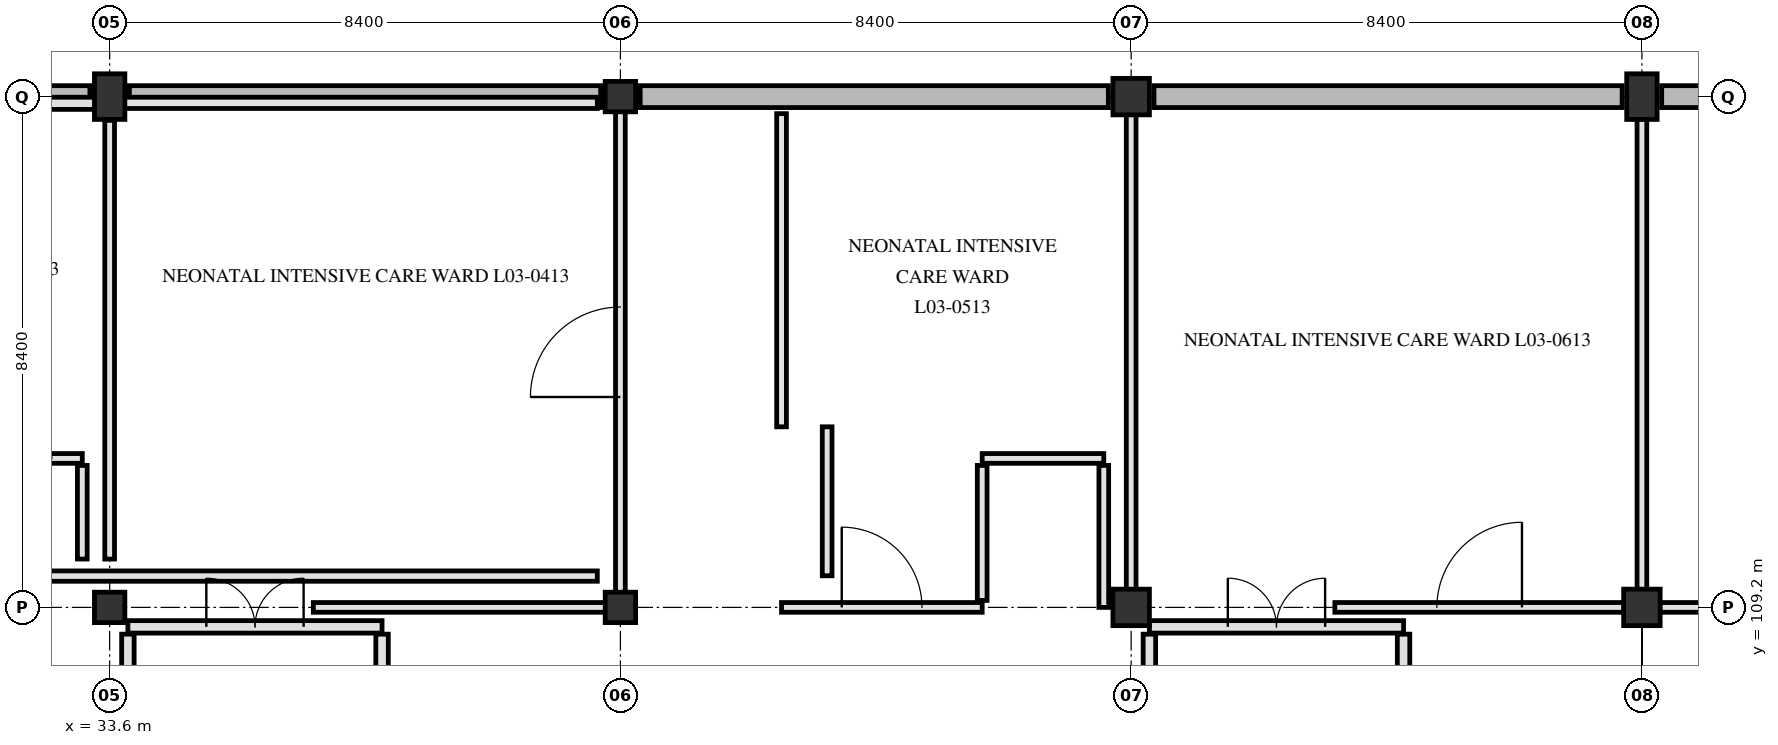
"""IFC4 building model, lengths in metres.
Left out: names, types, materials, properties, quantities, classifications, styles, units other than length and angle.
Written with IfcOpenShell. Run it as: python <this file> out.ifc"""

import sys

from ifc_helpers import new_model, si_unit, direction, frame, frame_2d, origin, origin_2d, place, context, subcontext, project, spatial, rectangle, extrude, element, fill, save


model = new_model("IFC4")
c1 = context("Model", 3, precision=1e-05, world=origin(), true_north=direction((0.0, 1.0)))
c2 = subcontext(c1, "Body", "Model", "MODEL_VIEW")
j1 = project(units=[si_unit("LENGTHUNIT", "METRE"), si_unit("PLANEANGLEUNIT", "RADIAN")], contexts=[c1])
p1 = place(None, origin())
s1 = spatial("IfcSite", under=j1, at=p1, CompositionType="ELEMENT")
p2 = place(p1, origin())
s2 = spatial("IfcBuilding", under=s1, at=p2, CompositionType="ELEMENT")
p3 = place(p2, frame((0.0, 0.0, 14.4)))
s3 = spatial("IfcBuildingStorey", under=s2, at=p3, CompositionType="ELEMENT", Elevation=14.4)
p4 = place(p3, frame((33.6, 109.2, 0.0), z_axis=(0.0, 0.0, 1.0), x_axis=(1.0, 0.0, 0.0)))
e1 = element("IfcColumn", 1, at=p4, inside=s3, PredefinedType="COLUMN", context=c2, shape_type="SweptSolid", body=[
    extrude(rectangle(XDim=0.5, YDim=0.5, at=origin_2d()), origin(), (0.0, 0.0, 1.0), 4.2),
])
p5 = place(p3, frame((33.6, 117.6, 0.0), z_axis=(0.0, 0.0, 1.0), x_axis=(1.0, 0.0, 0.0)))
e2 = element("IfcColumn", 2, at=p5, inside=s3, PredefinedType="PILASTER", context=c2, shape_type="SweptSolid", body=[
    extrude(rectangle(XDim=0.5, YDim=0.75, at=origin_2d()), origin(), (0.0, 0.0, 1.0), 4.2),
])
for number, where, z_axis, x_axis in (
    (3, (42.0, 109.2, 0.0), (0.0, 0.0, 1.0), (1.0, 0.0, 0.0)),
    (4, (42.0, 117.6, 0.0), (0.0, 0.0, 1.0), (1.0, 0.0, 0.0)),
):
    element("IfcColumn", number, at=place(p3, frame(where, z_axis=z_axis, x_axis=x_axis)), inside=s3, PredefinedType="COLUMN", context=c2, shape_type="SweptSolid", body=[
        extrude(rectangle(XDim=0.5, YDim=0.5, at=origin_2d()), origin(), (0.0, 0.0, 1.0), 4.2),
    ])
for number, where, z_axis, x_axis in (
    (5, (50.4, 109.2, 0.0), (0.0, 0.0, 1.0), (1.0, 0.0, 0.0)),
    (6, (50.4, 117.6, 0.0), (0.0, 0.0, 1.0), (1.0, 0.0, 0.0)),
    (7, (58.8, 109.2, 0.0), (0.0, 0.0, 1.0), (1.0, 0.0, 0.0)),
):
    element("IfcColumn", number, at=place(p3, frame(where, z_axis=z_axis, x_axis=x_axis)), inside=s3, PredefinedType="COLUMN", context=c2, shape_type="SweptSolid", body=[
        extrude(rectangle(XDim=0.6, YDim=0.6, at=origin_2d()), origin(), (0.0, 0.0, 1.0), 4.2),
    ])
p6 = place(p3, frame((58.8, 117.6, 0.0), z_axis=(0.0, 0.0, 1.0), x_axis=(1.0, 0.0, 0.0)))
e8 = element("IfcColumn", 8, at=p6, inside=s3, PredefinedType="PILASTER", context=c2, shape_type="SweptSolid", body=[
    extrude(rectangle(XDim=0.5, YDim=0.75, at=origin_2d()), origin(), (0.0, 0.0, 1.0), 4.2),
])
for number, where, z_axis, x_axis in (
    (9, (25.525, 117.6, 0.0), (0.0, 0.0, 1.0), (1.0, 0.0, 0.0)),
    (10, (33.925, 117.6, 0.0), (0.0, 0.0, 1.0), (1.0, 0.0, 0.0)),
):
    element("IfcWall", number, at=place(p3, frame(where, z_axis=z_axis, x_axis=x_axis)), inside=s3, PredefinedType="SOLIDWALL", context=c2, shape_type="SweptSolid", body=[
        extrude(rectangle(XDim=7.75, YDim=0.36, at=frame_2d((3.875, 0.0))), origin(), (0.0, 0.0, 1.0), 3.9),
    ])
p7 = place(p3, frame((42.325, 117.6, 0.0), z_axis=(0.0, 0.0, 1.0), x_axis=(1.0, 0.0, 0.0)))
e11 = element("IfcWall", 11, at=p7, inside=s3, PredefinedType="SOLIDWALL", context=c2, shape_type="SweptSolid", body=[
    extrude(rectangle(XDim=7.7, YDim=0.36, at=frame_2d((3.85, 0.0))), origin(), (0.0, 0.0, 1.0), 3.9),
])
p8 = place(p3, frame((50.775, 117.6, 0.0), z_axis=(0.0, 0.0, 1.0), x_axis=(1.0, 0.0, 0.0)))
e12 = element("IfcWall", 12, at=p8, inside=s3, PredefinedType="SOLIDWALL", context=c2, shape_type="SweptSolid", body=[
    extrude(rectangle(XDim=7.7, YDim=0.36, at=frame_2d((3.85, 0.0))), origin(), (0.0, 0.0, 1.0), 3.9),
])
p9 = place(p3, frame((59.125, 117.6, 0.0), z_axis=(0.0, 0.0, 1.0), x_axis=(1.0, 0.0, 0.0)))
e13 = element("IfcWall", 13, at=p9, inside=s3, PredefinedType="SOLIDWALL", context=c2, shape_type="SweptSolid", body=[
    extrude(rectangle(XDim=7.65, YDim=0.36, at=frame_2d((3.825, 0.0))), origin(), (0.0, 0.0, 1.0), 3.9),
])
p10 = place(p3, frame((25.2, 117.49, 4.18), z_axis=(0.0, 0.0, 1.0), x_axis=(1.0, 0.0, 0.0)))
e14 = element("IfcWall", 14, at=p10, inside=s3, PredefinedType="PARAPET", context=c2, shape_type="SweptSolid", body=[
    extrude(rectangle(XDim=8.4, YDim=0.2, at=frame_2d((4.2, 0.0))), origin(), (0.0, 0.0, 1.0), 1.17),
])
p11 = place(p3, frame((33.6, 117.498, 4.18), z_axis=(0.0, 0.0, 1.0), x_axis=(1.0, 0.0, 0.0)))
e15 = element("IfcWall", 15, at=p11, inside=s3, PredefinedType="PARAPET", context=c2, shape_type="SweptSolid", body=[
    extrude(rectangle(XDim=8.02, YDim=0.185, at=frame_2d((4.01, 0.0))), origin(), (0.0, 0.0, 1.0), 1.17),
])
p12 = place(p3, frame((41.62, 109.715, 4.18), z_axis=(0.0, 0.0, 1.0), x_axis=(-1.0, 0.0, 0.0)))
e16 = element("IfcWall", 16, at=p12, inside=s3, PredefinedType="PARAPET", context=c2, shape_type="SweptSolid", body=[
    extrude(rectangle(XDim=33.22, YDim=0.17, at=frame_2d((16.61, 0.0))), origin(), (0.0, 0.0, 1.0), 1.17),
])
p13 = place(p3, frame((38.08, 104.64, 0.0), z_axis=(0.0, 0.0, 1.0), x_axis=(0.0, 1.0, 0.0)))
e17 = element("IfcWall", 17, at=p13, inside=s3, PredefinedType="PARTITIONING", context=c2, shape_type="SweptSolid", body=[
    extrude(rectangle(XDim=4.12, YDim=0.205, at=frame_2d((2.06, 0.0))), origin(), (0.0, 0.0, 1.0), 3.89),
])
p14 = place(p3, frame((33.9, 104.64, 0.0), z_axis=(0.0, 0.0, 1.0), x_axis=(0.0, 1.0, 0.0)))
e18 = element("IfcWall", 18, at=p14, inside=s3, PredefinedType="PARTITIONING", context=c2, shape_type="SweptSolid", body=[
    extrude(rectangle(XDim=4.12, YDim=0.205, at=frame_2d((2.06, 0.0))), origin(), (0.0, 0.0, 1.0), 3.33),
])
p15 = place(p3, frame((33.9, 108.88, 0.0), z_axis=(0.0, 0.0, 1.0), x_axis=(1.0, 0.0, 0.0)))
e19 = element("IfcWall", 19, at=p15, inside=s3, PredefinedType="PARTITIONING", context=c2, shape_type="SweptSolid", body=[
    extrude(rectangle(XDim=4.18, YDim=0.205, at=frame_2d((2.09, 0.0))), origin(), (0.0, 0.0, 1.0), 3.28),
])
p16 = place(p15, frame((1.29, 0.0, 0.0)))
e20 = element("IfcOpeningElement", 20, at=p16, cuts=e19, PredefinedType="OPENING", context=c2, shape_type="SweptSolid", body=[
    extrude(rectangle(XDim=1.6, YDim=2.25, at=frame_2d((0.8, 1.125))), frame((0.0, 0.113, 0.0), z_axis=(0.0, -1.0, 0.0), x_axis=(1.0, 0.0, 0.0)), (0.0, 0.0, 1.0), 0.225),
])
p17 = place(p3, frame((54.88, 104.64, 0.0), z_axis=(0.0, 0.0, 1.0), x_axis=(0.0, 1.0, 0.0)))
e21 = element("IfcWall", 21, at=p17, inside=s3, PredefinedType="PARTITIONING", context=c2, shape_type="SweptSolid", body=[
    extrude(rectangle(XDim=4.12, YDim=0.205, at=frame_2d((2.06, 0.0))), origin(), (0.0, 0.0, 1.0), 3.89),
])
p18 = place(p3, frame((50.7, 104.64, 0.0), z_axis=(0.0, 0.0, 1.0), x_axis=(0.0, 1.0, 0.0)))
e22 = element("IfcWall", 22, at=p18, inside=s3, PredefinedType="PARTITIONING", context=c2, shape_type="SweptSolid", body=[
    extrude(rectangle(XDim=4.12, YDim=0.205, at=frame_2d((2.06, 0.0))), origin(), (0.0, 0.0, 1.0), 2.89),
])
p19 = place(p3, frame((50.7, 108.88, 0.0), z_axis=(0.0, 0.0, 1.0), x_axis=(1.0, 0.0, 0.0)))
e23 = element("IfcWall", 23, at=p19, inside=s3, PredefinedType="PARTITIONING", context=c2, shape_type="SweptSolid", body=[
    extrude(rectangle(XDim=4.18, YDim=0.205, at=frame_2d((2.09, 0.0))), origin(), (0.0, 0.0, 1.0), 2.89),
])
p20 = place(p19, frame((1.29, 0.0, 0.0)))
e24 = element("IfcOpeningElement", 24, at=p20, cuts=e23, PredefinedType="OPENING", context=c2, shape_type="SweptSolid", body=[
    extrude(rectangle(XDim=1.6, YDim=2.25, at=frame_2d((0.8, 1.125))), frame((0.0, 0.113, 0.0), z_axis=(0.0, -1.0, 0.0), x_axis=(1.0, 0.0, 0.0)), (0.0, 0.0, 1.0), 0.225),
])
p21 = place(p3, frame((36.95, 109.2, 0.0), z_axis=(0.0, 0.0, 1.0), x_axis=(1.0, 0.0, 0.0)))
e25 = element("IfcWall", 25, at=p21, inside=s3, PredefinedType="PARTITIONING", context=c2, shape_type="SweptSolid", body=[
    extrude(rectangle(XDim=4.805, YDim=0.16, at=frame_2d((2.402, 0.0))), origin(), (0.0, 0.0, 1.0), 3.28),
])
p22 = place(p3, frame((44.65, 109.2, 0.0), z_axis=(0.0, 0.0, 1.0), x_axis=(1.0, 0.0, 0.0)))
e26 = element("IfcWall", 26, at=p22, inside=s3, PredefinedType="PARTITIONING", context=c2, shape_type="SweptSolid", body=[
    extrude(rectangle(XDim=3.3, YDim=0.16, at=frame_2d((1.65, 0.0))), origin(), (0.0, 0.0, 1.0), 3.29),
])
p23 = place(p22, frame((0.99, 0.0, 0.0)))
e27 = element("IfcOpeningElement", 27, at=p23, cuts=e26, PredefinedType="OPENING", context=c2, shape_type="SweptSolid", body=[
    extrude(rectangle(XDim=1.32, YDim=2.18, at=frame_2d((0.66, 1.09))), frame((0.0, 0.09, 0.0), z_axis=(0.0, -1.0, 0.0), x_axis=(1.0, 0.0, 0.0)), (0.0, 0.0, 1.0), 0.18),
])
p24 = place(p3, frame((53.75, 109.2, 0.0), z_axis=(0.0, 0.0, 1.0), x_axis=(1.0, 0.0, 0.0)))
e28 = element("IfcWall", 28, at=p24, inside=s3, PredefinedType="PARTITIONING", context=c2, shape_type="SweptSolid", body=[
    extrude(rectangle(XDim=4.755, YDim=0.16, at=frame_2d((2.377, 0.0))), origin(), (0.0, 0.0, 1.0), 3.29),
])
p25 = place(p24, frame((1.677, 0.0, 0.0)))
e29 = element("IfcOpeningElement", 29, at=p25, cuts=e28, PredefinedType="OPENING", context=c2, shape_type="SweptSolid", body=[
    extrude(rectangle(XDim=1.4, YDim=2.2, at=frame_2d((0.7, 1.1))), frame((0.0, 0.09, 0.0), z_axis=(0.0, -1.0, 0.0), x_axis=(1.0, 0.0, 0.0)), (0.0, 0.0, 1.0), 0.18),
])
p26 = place(p3, frame((59.095, 109.2, 0.0), z_axis=(0.0, 0.0, 1.0), x_axis=(1.0, 0.0, 0.0)))
e30 = element("IfcWall", 30, at=p26, inside=s3, PredefinedType="PARTITIONING", context=c2, shape_type="SweptSolid", body=[
    extrude(rectangle(XDim=7.76, YDim=0.16, at=frame_2d((3.88, 0.0))), origin(), (0.0, 0.0, 1.0), 3.29),
])
p27 = place(p26, frame((3.38, 0.0, 0.0)))
e31 = element("IfcOpeningElement", 31, at=p27, cuts=e30, PredefinedType="OPENING", context=c2, shape_type="SweptSolid", body=[
    extrude(rectangle(XDim=1.0, YDim=2.15, at=frame_2d((0.5, 1.075))), frame((0.0, 0.09, 0.0), z_axis=(0.0, -1.0, 0.0), x_axis=(1.0, 0.0, 0.0)), (0.0, 0.0, 1.0), 0.18),
])
p28 = place(p3, frame((31.15, 111.65, 0.0), z_axis=(0.0, 0.0, 1.0), x_axis=(1.0, 0.0, 0.0)))
e32 = element("IfcWall", 32, at=p28, inside=s3, PredefinedType="PARTITIONING", context=c2, shape_type="SweptSolid", body=[
    extrude(rectangle(XDim=2.0, YDim=0.16, at=frame_2d((1.0, 0.0))), origin(), (0.0, 0.0, 1.0), 3.89),
])
p29 = place(p28, frame((0.5, 0.0, 0.0)))
e33 = element("IfcOpeningElement", 33, at=p29, cuts=e32, PredefinedType="OPENING", context=c2, shape_type="SweptSolid", body=[
    extrude(rectangle(XDim=1.0, YDim=2.15, at=frame_2d((0.5, 1.075))), frame((0.0, 0.09, 0.0), z_axis=(0.0, -1.0, 0.0), x_axis=(1.0, 0.0, 0.0)), (0.0, 0.0, 1.0), 0.18),
])
p30 = place(p3, frame((47.95, 111.65, 0.0), z_axis=(0.0, 0.0, 1.0), x_axis=(1.0, 0.0, 0.0)))
e34 = element("IfcWall", 34, at=p30, inside=s3, PredefinedType="PARTITIONING", context=c2, shape_type="SweptSolid", body=[
    extrude(rectangle(XDim=2.0, YDim=0.16, at=frame_2d((1.0, 0.0))), origin(), (0.0, 0.0, 1.0), 3.89),
])
p31 = place(p3, frame((33.15, 109.995, 0.0), z_axis=(0.0, 0.0, 1.0), x_axis=(0.0, 1.0, 0.0)))
e35 = element("IfcWall", 35, at=p31, inside=s3, PredefinedType="PARTITIONING", context=c2, shape_type="SweptSolid", body=[
    extrude(rectangle(XDim=1.54, YDim=0.16, at=frame_2d((0.77, 0.0))), origin(), (0.0, 0.0, 1.0), 3.89),
])
p32 = place(p3, frame((33.6, 109.995, 0.0), z_axis=(0.0, 0.0, 1.0), x_axis=(0.0, 1.0, 0.0)))
e36 = element("IfcWall", 36, at=p32, inside=s3, PredefinedType="PARTITIONING", context=c2, shape_type="SweptSolid", body=[
    extrude(rectangle(XDim=7.215, YDim=0.16, at=frame_2d((3.607, 0.0))), origin(), (0.0, 0.0, 1.0), 3.34),
])
p33 = place(p3, frame((42.0, 109.445, 0.0), z_axis=(0.0, 0.0, 1.0), x_axis=(0.0, 1.0, 0.0)))
e37 = element("IfcWall", 37, at=p33, inside=s3, PredefinedType="PARTITIONING", context=c2, shape_type="SweptSolid", body=[
    extrude(rectangle(XDim=7.91, YDim=0.16, at=frame_2d((3.955, 0.0))), origin(), (0.0, 0.0, 1.0), 3.34),
])
p34 = place(p33, frame((3.215, 0.0, 0.0)))
e38 = element("IfcOpeningElement", 38, at=p34, cuts=e37, PredefinedType="OPENING", context=c2, shape_type="SweptSolid", body=[
    extrude(rectangle(XDim=1.48, YDim=2.22, at=frame_2d((0.74, 1.11))), frame((0.0, 0.09, 0.0), z_axis=(0.0, -1.0, 0.0), x_axis=(1.0, 0.0, 0.0)), (0.0, 0.0, 1.0), 0.18),
])
p35 = place(p3, frame((44.65, 112.17, 0.0), z_axis=(0.0, 0.0, 1.0), x_axis=(0.0, 1.0, 0.0)))
e39 = element("IfcWall", 39, at=p35, inside=s3, PredefinedType="PARTITIONING", context=c2, shape_type="SweptSolid", body=[
    extrude(rectangle(XDim=5.15, YDim=0.16, at=frame_2d((2.575, 0.0))), origin(), (0.0, 0.0, 1.0), 3.89),
])
p36 = place(p3, frame((45.4, 109.72, 0.0), z_axis=(0.0, 0.0, 1.0), x_axis=(0.0, 1.0, 0.0)))
e40 = element("IfcWall", 40, at=p36, inside=s3, PredefinedType="PARTITIONING", context=c2, shape_type="SweptSolid", body=[
    extrude(rectangle(XDim=2.45, YDim=0.16, at=frame_2d((1.225, 0.0))), origin(), (0.0, 0.0, 1.0), 3.89),
])
p37 = place(p3, frame((47.95, 109.315, 0.0), z_axis=(0.0, 0.0, 1.0), x_axis=(0.0, 1.0, 0.0)))
e41 = element("IfcWall", 41, at=p37, inside=s3, PredefinedType="PARTITIONING", context=c2, shape_type="SweptSolid", body=[
    extrude(rectangle(XDim=2.22, YDim=0.16, at=frame_2d((1.11, 0.0))), origin(), (0.0, 0.0, 1.0), 3.29),
])
p38 = place(p3, frame((49.95, 109.2, 0.0), z_axis=(0.0, 0.0, 1.0), x_axis=(0.0, 1.0, 0.0)))
e42 = element("IfcWall", 42, at=p38, inside=s3, PredefinedType="PARTITIONING", context=c2, shape_type="SweptSolid", body=[
    extrude(rectangle(XDim=2.335, YDim=0.16, at=frame_2d((1.167, 0.0))), origin(), (0.0, 0.0, 1.0), 3.29),
])
p39 = place(p3, frame((50.4, 109.495, 0.0), z_axis=(0.0, 0.0, 1.0), x_axis=(0.0, 1.0, 0.0)))
e43 = element("IfcWall", 43, at=p39, inside=s3, PredefinedType="PARTITIONING", context=c2, shape_type="SweptSolid", body=[
    extrude(rectangle(XDim=7.81, YDim=0.16, at=frame_2d((3.905, 0.0))), origin(), (0.0, 0.0, 1.0), 2.89),
])
p40 = place(p3, frame((58.8, 109.495, 0.0), z_axis=(0.0, 0.0, 1.0), x_axis=(0.0, 1.0, 0.0)))
e44 = element("IfcWall", 44, at=p40, inside=s3, PredefinedType="PARTITIONING", context=c2, shape_type="SweptSolid", body=[
    extrude(rectangle(XDim=7.735, YDim=0.16, at=frame_2d((3.867, 0.0))), origin(), (0.0, 0.0, 1.0), 3.34),
])
p41 = place(p16, origin())
e45 = element("IfcDoor", 45, at=p41, inside=s3, OperationType="DOUBLE_SWING_LEFT", PredefinedType="DOOR", context=c2, shape_type="SweptSolid", body=[
    extrude(rectangle(XDim=1.6, YDim=2.25, at=frame_2d((0.8, 1.125))), frame((0.0, 0.025, 0.0), z_axis=(0.0, -1.0, 0.0), x_axis=(1.0, 0.0, 0.0)), (0.0, 0.0, 1.0), 0.05),
])
fill(e20, e45)
p42 = place(p20, origin())
e46 = element("IfcDoor", 46, at=p42, inside=s3, OperationType="DOUBLE_SWING_LEFT", PredefinedType="DOOR", context=c2, shape_type="SweptSolid", body=[
    extrude(rectangle(XDim=1.6, YDim=2.25, at=frame_2d((0.8, 1.125))), frame((0.0, 0.025, 0.0), z_axis=(0.0, -1.0, 0.0), x_axis=(1.0, 0.0, 0.0)), (0.0, 0.0, 1.0), 0.05),
])
fill(e24, e46)
p43 = place(p34, origin())
e47 = element("IfcDoor", 47, at=p43, inside=s3, OperationType="SINGLE_SWING_LEFT", PredefinedType="DOOR", context=c2, shape_type="SweptSolid", body=[
    extrude(rectangle(XDim=1.48, YDim=2.22, at=frame_2d((0.74, 1.11))), frame((0.0, 0.025, 0.0), z_axis=(0.0, -1.0, 0.0), x_axis=(1.0, 0.0, 0.0)), (0.0, 0.0, 1.0), 0.05),
])
fill(e38, e47)
p44 = place(p23, origin())
e48 = element("IfcDoor", 48, at=p44, inside=s3, OperationType="SINGLE_SWING_LEFT", PredefinedType="DOOR", context=c2, shape_type="SweptSolid", body=[
    extrude(rectangle(XDim=1.32, YDim=2.18, at=frame_2d((0.66, 1.09))), frame((0.0, 0.025, 0.0), z_axis=(0.0, -1.0, 0.0), x_axis=(1.0, 0.0, 0.0)), (0.0, 0.0, 1.0), 0.05),
])
fill(e27, e48)
p45 = place(p25, origin())
e49 = element("IfcDoor", 49, at=p45, inside=s3, OperationType="SINGLE_SWING_RIGHT", PredefinedType="DOOR", context=c2, shape_type="SweptSolid", body=[
    extrude(rectangle(XDim=1.4, YDim=2.2, at=frame_2d((0.7, 1.1))), frame((0.0, 0.025, 0.0), z_axis=(0.0, -1.0, 0.0), x_axis=(1.0, 0.0, 0.0)), (0.0, 0.0, 1.0), 0.05),
])
fill(e29, e49)
save(model, sys.argv[1])
